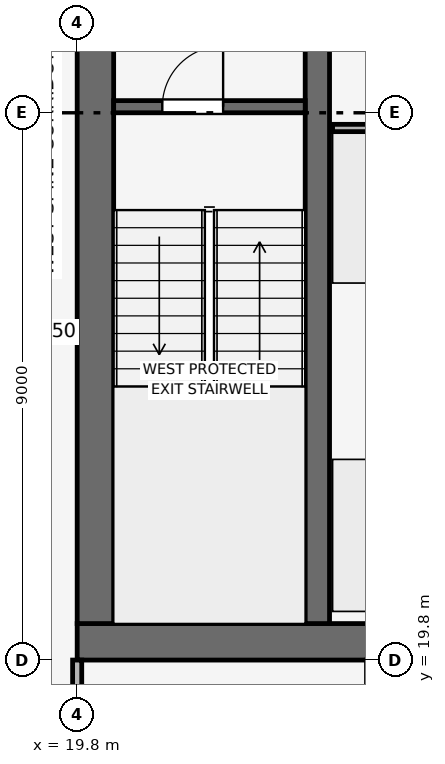
"""IFC4 building model, lengths in metres.
Left out: names, types, materials, properties, quantities, classifications, styles, units other than length and angle.
Written with IfcOpenShell. Run it as: python <this file> out.ifc"""

import sys

from ifc_helpers import new_model, si_unit, direction, frame, frame_2d, origin, place, context, subcontext, project, spatial, rectangle, extrude, element, fill, save


model = new_model("IFC4")
c1 = context("Model", 3, precision=1e-05, world=origin(), true_north=direction((0.0, 1.0)))
c2 = subcontext(c1, "Body", "Model", "MODEL_VIEW")
j1 = project(units=[si_unit("LENGTHUNIT", "METRE"), si_unit("PLANEANGLEUNIT", "RADIAN")], contexts=[c1])
p1 = place(None, origin())
s1 = spatial("IfcSite", under=j1, at=p1, CompositionType="ELEMENT")
p2 = place(p1, origin())
s2 = spatial("IfcBuilding", under=s1, at=p2, CompositionType="ELEMENT")
p3 = place(p2, frame((0.0, 0.0, 314.25)))
s3 = spatial("IfcBuildingStorey", under=s2, at=p3, CompositionType="ELEMENT", Elevation=314.25)
p4 = place(p3, frame((19.8, 20.1, 0.0), z_axis=(0.0, 0.0, 1.0), x_axis=(1.0, 0.0, 0.0)))
e1 = element("IfcWall", 1, at=p4, inside=s3, PredefinedType="SHEAR", context=c2, shape_type="SweptSolid", body=[
    extrude(rectangle(XDim=18.0, YDim=0.6, at=frame_2d((9.0, 0.0))), origin(), (0.0, 0.0, 1.0), 3.75),
])
p5 = place(p3, frame((20.1, 20.4, 0.0), z_axis=(0.0, 0.0, 1.0), x_axis=(0.0, 1.0, 0.0)))
e2 = element("IfcWall", 2, at=p5, inside=s3, PredefinedType="SHEAR", context=c2, shape_type="SweptSolid", body=[
    extrude(rectangle(XDim=16.8, YDim=0.6, at=frame_2d((8.4, 0.0))), origin(), (0.0, 0.0, 1.0), 3.75),
])
p6 = place(p5, frame((10.4, 0.0, 0.0)))
e3 = element("IfcOpeningElement", 3, at=p6, cuts=e2, PredefinedType="OPENING", context=c2, shape_type="SweptSolid", body=[
    extrude(rectangle(XDim=1.1, YDim=2.15, at=frame_2d((0.55, 1.075))), frame((0.0, 0.31, 0.0), z_axis=(0.0, -1.0, 0.0), x_axis=(1.0, 0.0, 0.0)), (0.0, 0.0, 1.0), 0.62),
])
p7 = place(p3, frame((23.75, 20.4, 0.0), z_axis=(0.0, 0.0, 1.0), x_axis=(0.0, 1.0, 0.0)))
e4 = element("IfcWall", 4, at=p7, inside=s3, PredefinedType="SHEAR", context=c2, shape_type="SweptSolid", body=[
    extrude(rectangle(XDim=16.8, YDim=0.4, at=frame_2d((8.4, 0.0))), origin(), (0.0, 0.0, 1.0), 3.75),
])
p8 = place(p3, frame((20.4, 28.9, 0.0), z_axis=(0.0, 0.0, 1.0), x_axis=(1.0, 0.0, 0.0)))
e5 = element("IfcWall", 5, at=p8, inside=s3, PredefinedType="SHEAR", context=c2, shape_type="SweptSolid", body=[
    extrude(rectangle(XDim=3.15, YDim=0.2, at=frame_2d((1.575, 0.0))), origin(), (0.0, 0.0, 1.0), 3.51),
])
p9 = place(p8, frame((0.8, 0.0, 0.0)))
e6 = element("IfcOpeningElement", 6, at=p9, cuts=e5, PredefinedType="OPENING", context=c2, shape_type="SweptSolid", body=[
    extrude(rectangle(XDim=1.0, YDim=2.1, at=frame_2d((0.5, 1.05))), frame((0.0, 0.11, 0.0), z_axis=(0.0, -1.0, 0.0), x_axis=(1.0, 0.0, 0.0)), (0.0, 0.0, 1.0), 0.22),
])
p10 = place(p3, frame((24.0, 28.55, 0.0), z_axis=(0.0, 0.0, 1.0), x_axis=(1.0, 0.0, 0.0)))
e7 = element("IfcWall", 7, at=p10, inside=s3, PredefinedType="PARTITIONING", context=c2, shape_type="SweptSolid", body=[
    extrude(rectangle(XDim=4.05, YDim=0.12, at=frame_2d((2.025, 0.0))), origin(), (0.0, 0.0, 1.0), 3.51),
])
p11 = place(p10, frame((1.575, 0.0, 0.0)))
e8 = element("IfcOpeningElement", 8, at=p11, cuts=e7, PredefinedType="OPENING", context=c2, shape_type="SweptSolid", body=[
    extrude(rectangle(XDim=0.9, YDim=2.1, at=frame_2d((0.45, 1.05))), frame((0.0, 0.07, 0.0), z_axis=(0.0, -1.0, 0.0), x_axis=(1.0, 0.0, 0.0)), (0.0, 0.0, 1.0), 0.14),
])
p12 = place(p3, frame((19.8, 6.13, 0.0), z_axis=(0.0, 0.0, 1.0), x_axis=(0.0, 1.0, 0.0)))
e9 = element("IfcWall", 9, at=p12, inside=s3, PredefinedType="PARTITIONING", context=c2, shape_type="SweptSolid", body=[
    extrude(rectangle(XDim=13.67, YDim=0.15, at=frame_2d((6.835, 0.0))), origin(), (0.0, 0.0, 1.0), 3.095),
])
p13 = place(p12, frame((9.47, 0.0, 0.0)))
e10 = element("IfcOpeningElement", 10, at=p13, cuts=e9, PredefinedType="OPENING", context=c2, shape_type="SweptSolid", body=[
    extrude(rectangle(XDim=0.9, YDim=2.1, at=frame_2d((0.45, 1.05))), frame((0.0, 0.085, 0.0), z_axis=(0.0, -1.0, 0.0), x_axis=(1.0, 0.0, 0.0)), (0.0, 0.0, 1.0), 0.17),
])
p14 = place(p9, origin())
e11 = element("IfcDoor", 11, at=p14, inside=s3, OperationType="SINGLE_SWING_RIGHT", PredefinedType="DOOR", context=c2, shape_type="SweptSolid", body=[
    extrude(rectangle(XDim=1.0, YDim=2.1, at=frame_2d((0.5, 1.05))), frame((0.0, 0.025, 0.0), z_axis=(0.0, -1.0, 0.0), x_axis=(1.0, 0.0, 0.0)), (0.0, 0.0, 1.0), 0.05),
])
fill(e6, e11)
save(model, sys.argv[1])
